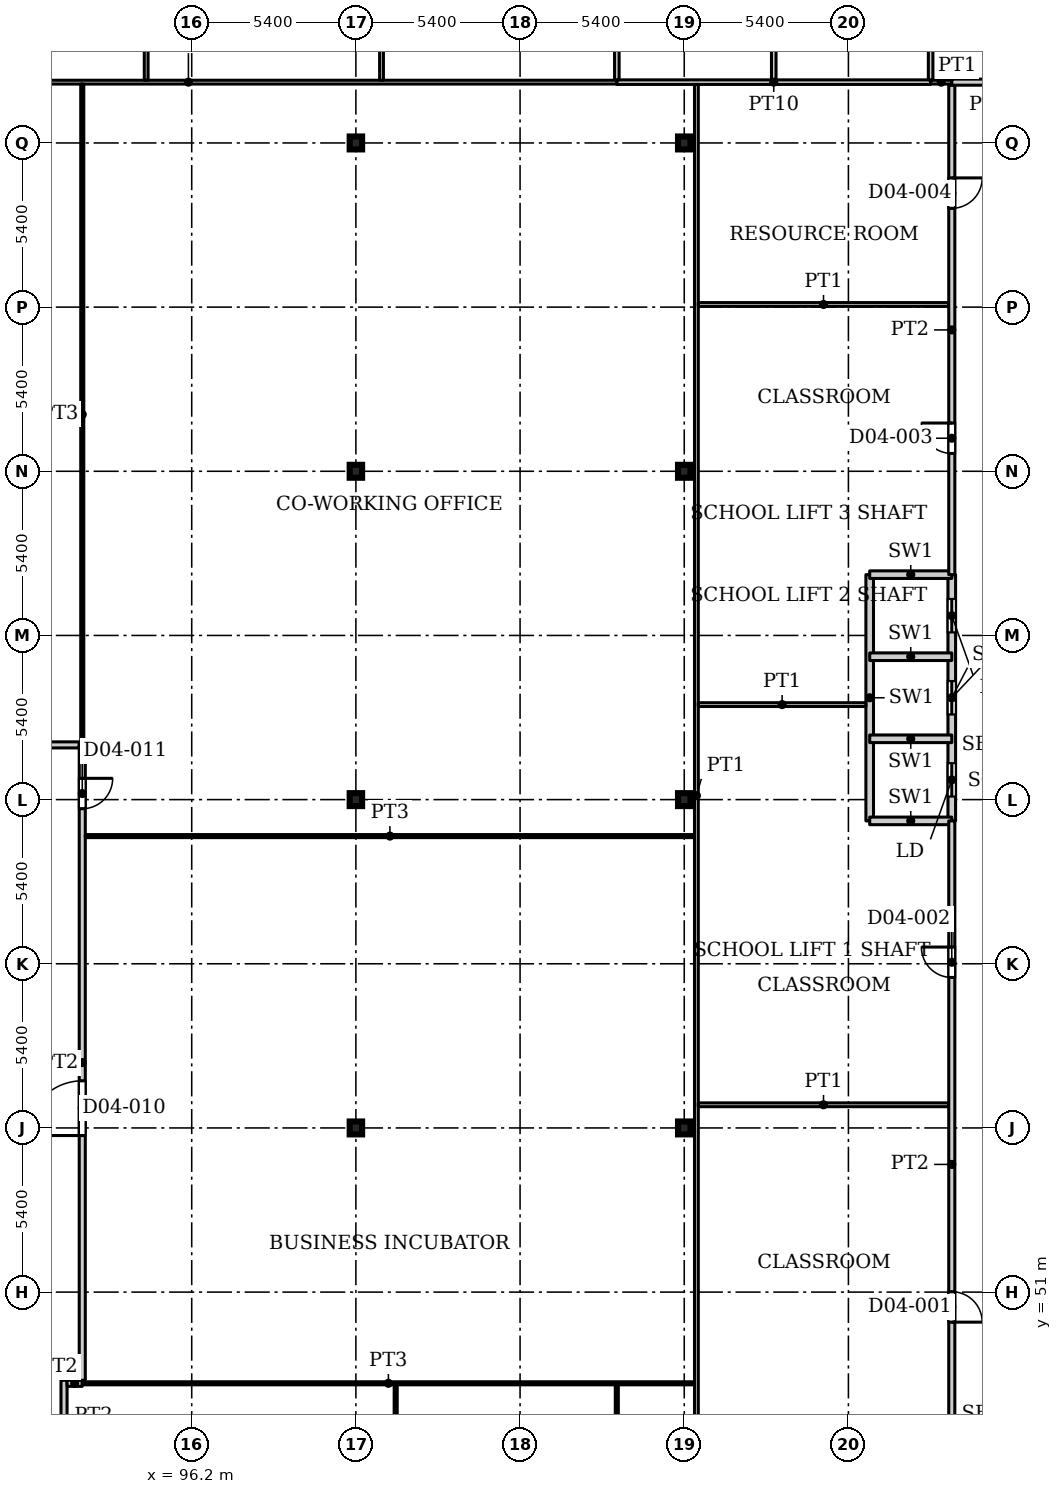
"""IFC4 building model, lengths in metres.
Left out: names, types, materials, properties, quantities, classifications, styles, units other than length and angle.
Written with IfcOpenShell. Run it as: python <this file> out.ifc"""

import sys

from ifc_helpers import new_model, si_unit, direction, frame, frame_2d, origin, origin_2d, place, context, subcontext, project, spatial, rectangle, i_section, extrude, source, transform, mapped, element, fill, save


model = new_model("IFC4")
c1 = context("Model", 3, precision=1e-05, world=origin(), true_north=direction((0.0, 1.0)))
c2 = subcontext(c1, "Body", "Model", "MODEL_VIEW")
j1 = project(units=[si_unit("LENGTHUNIT", "METRE"), si_unit("PLANEANGLEUNIT", "RADIAN")], contexts=[c1])
p1 = place(None, origin())
s1 = spatial("IfcSite", under=j1, at=p1, CompositionType="ELEMENT")
p2 = place(p1, origin())
s2 = spatial("IfcBuilding", under=s1, at=p2, CompositionType="ELEMENT")
p3 = place(p2, frame((0.0, 0.0, 21.5)))
s3 = spatial("IfcBuildingStorey", under=s2, at=p3, CompositionType="ELEMENT", Elevation=21.5)
for number, where, z_axis, x_axis in (
    (1, (101.6, 56.4, 0.0), (0.0, 0.0, 1.0), (1.0, 0.0, 0.0)),
    (2, (112.4, 56.4, 0.0), (0.0, 0.0, 1.0), (1.0, 0.0, 0.0)),
    (3, (101.6, 67.2, 0.0), (0.0, 0.0, 1.0), (1.0, 0.0, 0.0)),
    (4, (112.4, 67.2, 0.0), (0.0, 0.0, 1.0), (1.0, 0.0, 0.0)),
    (5, (101.6, 78.0, 0.0), (0.0, 0.0, 1.0), (1.0, 0.0, 0.0)),
    (6, (112.4, 78.0, 0.0), (0.0, 0.0, 1.0), (1.0, 0.0, 0.0)),
    (7, (101.6, 88.8, 0.0), (0.0, 0.0, 1.0), (1.0, 0.0, 0.0)),
    (8, (112.4, 88.8, 0.0), (0.0, 0.0, 1.0), (1.0, 0.0, 0.0)),
):
    element("IfcColumn", number, at=place(p3, frame(where, z_axis=z_axis, x_axis=x_axis)), inside=s3, PredefinedType="COLUMN", context=c2, shape_type="SweptSolid", body=[
        extrude(i_section(OverallWidth=0.409, OverallDepth=0.425, WebThickness=0.033, FlangeThickness=0.052, FilletRadius=0.013, at=origin_2d()), origin(), (0.0, 0.0, 1.0), 4.5),
    ])
p4 = place(p3, frame((118.5, 66.5, 0.0), z_axis=(0.0, 0.0, 1.0), x_axis=(0.0, 1.0, 0.0)))
e9 = element("IfcWall", 9, at=p4, inside=s3, PredefinedType="PARTITIONING", context=c2, shape_type="SweptSolid", body=[
    extrude(rectangle(XDim=8.1, YDim=0.25, at=frame_2d((4.05, 0.0))), origin(), (0.0, 0.0, 1.0), 4.5),
])
p5 = place(p3, frame((121.2, 66.5, 0.0), z_axis=(0.0, 0.0, 1.0), x_axis=(0.0, 1.0, 0.0)))
e10 = element("IfcWall", 10, at=p5, inside=s3, PredefinedType="PARTITIONING", context=c2, shape_type="SweptSolid", body=[
    extrude(rectangle(XDim=8.1, YDim=0.25, at=frame_2d((4.05, 0.0))), origin(), (0.0, 0.0, 1.0), 4.5),
])
p6 = place(p5, frame((0.8, 0.0, 0.0)))
e11 = element("IfcOpeningElement", 11, at=p6, cuts=e10, PredefinedType="OPENING", context=c2, shape_type="SweptSolid", body=[
    extrude(rectangle(XDim=1.1, YDim=2.2, at=frame_2d((0.55, 1.1))), frame((0.0, 0.135, 0.0), z_axis=(0.0, -1.0, 0.0), x_axis=(1.0, 0.0, 0.0)), (0.0, 0.0, 1.0), 0.27),
])
p7 = place(p5, frame((3.5, 0.0, 0.0)))
e12 = element("IfcOpeningElement", 12, at=p7, cuts=e10, PredefinedType="OPENING", context=c2, shape_type="SweptSolid", body=[
    extrude(rectangle(XDim=1.1, YDim=2.2, at=frame_2d((0.55, 1.1))), frame((0.0, 0.135, 0.0), z_axis=(0.0, -1.0, 0.0), x_axis=(1.0, 0.0, 0.0)), (0.0, 0.0, 1.0), 0.27),
])
p8 = place(p5, frame((6.2, 0.0, 0.0)))
e13 = element("IfcOpeningElement", 13, at=p8, cuts=e10, PredefinedType="OPENING", context=c2, shape_type="SweptSolid", body=[
    extrude(rectangle(XDim=1.1, YDim=2.2, at=frame_2d((0.55, 1.1))), frame((0.0, 0.135, 0.0), z_axis=(0.0, -1.0, 0.0), x_axis=(1.0, 0.0, 0.0)), (0.0, 0.0, 1.0), 0.27),
])
for number, where, z_axis, x_axis in (
    (14, (118.5, 66.5, 0.0), (0.0, 0.0, 1.0), (1.0, 0.0, 0.0)),
    (15, (118.5, 69.2, 0.0), (0.0, 0.0, 1.0), (1.0, 0.0, 0.0)),
    (16, (118.5, 71.9, 0.0), (0.0, 0.0, 1.0), (1.0, 0.0, 0.0)),
    (17, (118.5, 74.6, 0.0), (0.0, 0.0, 1.0), (1.0, 0.0, 0.0)),
):
    element("IfcWall", number, at=place(p3, frame(where, z_axis=z_axis, x_axis=x_axis)), inside=s3, PredefinedType="PARTITIONING", context=c2, shape_type="SweptSolid", body=[
        extrude(rectangle(XDim=2.7, YDim=0.25, at=frame_2d((1.35, 0.0))), origin(), (0.0, 0.0, 1.0), 4.5),
    ])
p9 = place(p3, frame((67.5, 69.0, 0.0), z_axis=(0.0, 0.0, 1.0), x_axis=(1.0, 0.0, 0.0)))
e18 = element("IfcWall", 18, at=p9, inside=s3, PredefinedType="PARTITIONING", context=c2, shape_type="SweptSolid", body=[
    extrude(rectangle(XDim=25.0, YDim=0.2, at=frame_2d((12.5, 0.0))), origin(), (0.0, 0.0, 1.0), 4.18),
])
p10 = place(p9, frame((11.4, 0.0, 0.0)))
e19 = element("IfcOpeningElement", 19, at=p10, cuts=e18, PredefinedType="OPENING", context=c2, shape_type="SweptSolid", body=[
    extrude(rectangle(XDim=2.0, YDim=2.1, at=frame_2d((1.0, 1.05))), frame((0.0, 0.11, 0.0), z_axis=(0.0, -1.0, 0.0), x_axis=(1.0, 0.0, 0.0)), (0.0, 0.0, 1.0), 0.22),
])
p11 = place(p9, frame((4.3, 0.0, 0.0)))
e20 = element("IfcOpeningElement", 20, at=p11, cuts=e18, PredefinedType="OPENING", context=c2, shape_type="SweptSolid", body=[
    extrude(rectangle(XDim=1.8, YDim=2.1, at=frame_2d((0.9, 1.05))), frame((0.0, 0.11, 0.0), z_axis=(0.0, -1.0, 0.0), x_axis=(1.0, 0.0, 0.0)), (0.0, 0.0, 1.0), 0.22),
])
p12 = place(p9, frame((18.9, 0.0, 0.0)))
e21 = element("IfcOpeningElement", 21, at=p12, cuts=e18, PredefinedType="OPENING", context=c2, shape_type="SweptSolid", body=[
    extrude(rectangle(XDim=1.8, YDim=2.1, at=frame_2d((0.9, 1.05))), frame((0.0, 0.11, 0.0), z_axis=(0.0, -1.0, 0.0), x_axis=(1.0, 0.0, 0.0)), (0.0, 0.0, 1.0), 0.22),
])
p13 = place(p3, frame((82.0, 90.8, 0.0), z_axis=(0.0, 0.0, 1.0), x_axis=(1.0, 0.0, 0.0)))
e22 = element("IfcWall", 22, at=p13, inside=s3, PredefinedType="PARTITIONING", context=c2, shape_type="SweptSolid", body=[
    extrude(rectangle(XDim=28.183, YDim=0.125, at=frame_2d((14.092, 0.0))), origin(), (0.0, 0.0, 1.0), 4.18),
])
p14 = place(p3, frame((92.0, 43.8, 0.0), z_axis=(0.0, 0.0, 1.0), x_axis=(0.0, 1.0, 0.0)))
e23 = element("IfcWall", 23, at=p14, inside=s3, PredefinedType="PARTITIONING", context=c2, shape_type="SweptSolid", body=[
    extrude(rectangle(XDim=4.3, YDim=0.2, at=frame_2d((2.15, 0.0))), origin(), (0.0, 0.0, 1.0), 4.18),
])
p15 = place(p3, frame((92.1, 48.0, 0.0), z_axis=(0.0, 0.0, 1.0), x_axis=(1.0, 0.0, 0.0)))
e24 = element("IfcWall", 24, at=p15, inside=s3, PredefinedType="PARTITIONING", context=c2, shape_type="SweptSolid", body=[
    extrude(rectangle(XDim=0.5, YDim=0.2, at=frame_2d((0.25, 0.0))), origin(), (0.0, 0.0, 1.0), 4.18),
])
p16 = place(p3, frame((92.6, 48.0, 0.0), z_axis=(0.0, 0.0, 1.0), x_axis=(1.0, 0.0, 0.0)))
e25 = element("IfcWall", 25, at=p16, inside=s3, PredefinedType="PARTITIONING", context=c2, shape_type="SweptSolid", body=[
    extrude(rectangle(XDim=20.138, YDim=0.1, at=frame_2d((10.069, 0.0))), origin(), (0.0, 0.0, 1.0), 4.18),
])
p17 = place(p3, frame((92.6, 48.1, 0.0), z_axis=(0.0, 0.0, 1.0), x_axis=(0.0, 1.0, 0.0)))
e26 = element("IfcWall", 26, at=p17, inside=s3, PredefinedType="PARTITIONING", context=c2, shape_type="SweptSolid", body=[
    extrude(rectangle(XDim=20.9, YDim=0.2, at=frame_2d((10.45, 0.0))), origin(), (0.0, 0.0, 1.0), 4.18),
])
p18 = place(p17, frame((8.05, 0.0, 0.0)))
e27 = element("IfcOpeningElement", 27, at=p18, cuts=e26, PredefinedType="OPENING", context=c2, shape_type="SweptSolid", body=[
    extrude(rectangle(XDim=1.8, YDim=2.1, at=frame_2d((0.9, 1.05))), frame((0.0, 0.11, 0.0), z_axis=(0.0, -1.0, 0.0), x_axis=(1.0, 0.0, 0.0)), (0.0, 0.0, 1.0), 0.22),
])
p19 = place(p17, frame((18.8, 0.0, 0.0)))
e28 = element("IfcOpeningElement", 28, at=p19, cuts=e26, PredefinedType="OPENING", context=c2, shape_type="SweptSolid", body=[
    extrude(rectangle(XDim=1.0, YDim=2.1, at=frame_2d((0.5, 1.05))), frame((0.0, 0.11, 0.0), z_axis=(0.0, -1.0, 0.0), x_axis=(1.0, 0.0, 0.0)), (0.0, 0.0, 1.0), 0.22),
])
p20 = place(p3, frame((92.6, 69.0, 0.0), z_axis=(0.0, 0.0, 1.0), x_axis=(0.0, 1.0, 0.0)))
e29 = element("IfcWall", 29, at=p20, inside=s3, PredefinedType="PARTITIONING", context=c2, shape_type="SweptSolid", body=[
    extrude(rectangle(XDim=21.738, YDim=0.1, at=frame_2d((10.869, 0.0))), origin(), (0.0, 0.0, 1.0), 4.18),
])
p21 = place(p3, frame((92.7, 66.0, 0.0), z_axis=(0.0, 0.0, 1.0), x_axis=(1.0, 0.0, 0.0)))
e30 = element("IfcWall", 30, at=p21, inside=s3, PredefinedType="PARTITIONING", context=c2, shape_type="SweptSolid", body=[
    extrude(rectangle(XDim=20.038, YDim=0.1, at=frame_2d((10.019, 0.0))), origin(), (0.0, 0.0, 1.0), 4.18),
])
for number, where, z_axis, x_axis in (
    (31, (94.702, 90.862, 0.0), (0.0, 0.0, 1.0), (0.0, 1.0, 0.0)),
    (32, (102.443, 90.862, 0.0), (0.0, 0.0, 1.0), (0.0, 1.0, 0.0)),
):
    element("IfcWall", number, at=place(p3, frame(where, z_axis=z_axis, x_axis=x_axis)), inside=s3, PredefinedType="PARTITIONING", context=c2, shape_type="SweptSolid", body=[
        extrude(rectangle(XDim=8.238, YDim=0.125, at=frame_2d((4.119, 0.0))), origin(), (0.0, 0.0, 1.0), 4.18),
    ])
for number, where, z_axis, x_axis in (
    (33, (102.909, 35.3, 0.0), (0.0, 0.0, 1.0), (0.0, 1.0, 0.0)),
    (34, (110.182, 35.3, 0.0), (0.0, 0.0, 1.0), (0.0, 1.0, 0.0)),
):
    element("IfcWall", number, at=place(p3, frame(where, z_axis=z_axis, x_axis=x_axis)), inside=s3, PredefinedType="PARTITIONING", context=c2, shape_type="SweptSolid", body=[
        extrude(rectangle(XDim=12.65, YDim=0.1, at=frame_2d((6.325, 0.0))), origin(), (0.0, 0.0, 1.0), 4.18),
    ])
p22 = place(p3, frame((110.183, 90.8, 0.0), z_axis=(0.0, 0.0, 1.0), x_axis=(1.0, 0.0, 0.0)))
e35 = element("IfcWall", 35, at=p22, inside=s3, PredefinedType="PARTITIONING", context=c2, shape_type="SweptSolid", body=[
    extrude(rectangle(XDim=10.321, YDim=0.15, at=frame_2d((5.16, 0.0))), origin(), (0.0, 0.0, 1.0), 4.18),
])
p23 = place(p3, frame((110.183, 90.875, 0.0), z_axis=(0.0, 0.0, 1.0), x_axis=(0.0, 1.0, 0.0)))
e36 = element("IfcWall", 36, at=p23, inside=s3, PredefinedType="PARTITIONING", context=c2, shape_type="SweptSolid", body=[
    extrude(rectangle(XDim=8.225, YDim=0.15, at=frame_2d((4.113, 0.0))), origin(), (0.0, 0.0, 1.0), 4.18),
])
p24 = place(p3, frame((112.8, 43.938, 0.0), z_axis=(0.0, 0.0, 1.0), x_axis=(0.0, 1.0, 0.0)))
e37 = element("IfcWall", 37, at=p24, inside=s3, PredefinedType="PARTITIONING", context=c2, shape_type="SweptSolid", body=[
    extrude(rectangle(XDim=46.787, YDim=0.125, at=frame_2d((23.394, 0.0))), origin(), (0.0, 0.0, 1.0), 4.18),
])
p25 = place(p3, frame((112.862, 57.162, 0.0), z_axis=(0.0, 0.0, 1.0), x_axis=(1.0, 0.0, 0.0)))
e38 = element("IfcWall", 38, at=p25, inside=s3, PredefinedType="PARTITIONING", context=c2, shape_type="SweptSolid", body=[
    extrude(rectangle(XDim=8.238, YDim=0.125, at=frame_2d((4.119, 0.0))), origin(), (0.0, 0.0, 1.0), 4.18),
])
p26 = place(p3, frame((112.862, 70.325, 0.0), z_axis=(0.0, 0.0, 1.0), x_axis=(1.0, 0.0, 0.0)))
e39 = element("IfcWall", 39, at=p26, inside=s3, PredefinedType="PARTITIONING", context=c2, shape_type="SweptSolid", body=[
    extrude(rectangle(XDim=5.514, YDim=0.125, at=frame_2d((2.757, 0.0))), origin(), (0.0, 0.0, 1.0), 4.18),
])
p27 = place(p3, frame((112.862, 83.487, 0.0), z_axis=(0.0, 0.0, 1.0), x_axis=(1.0, 0.0, 0.0)))
e40 = element("IfcWall", 40, at=p27, inside=s3, PredefinedType="PARTITIONING", context=c2, shape_type="SweptSolid", body=[
    extrude(rectangle(XDim=8.238, YDim=0.125, at=frame_2d((4.119, 0.0))), origin(), (0.0, 0.0, 1.0), 4.18),
])
p28 = place(p3, frame((115.344, 90.875, 0.0), z_axis=(0.0, 0.0, 1.0), x_axis=(0.0, 1.0, 0.0)))
e41 = element("IfcWall", 41, at=p28, inside=s3, PredefinedType="PARTITIONING", context=c2, shape_type="SweptSolid", body=[
    extrude(rectangle(XDim=8.225, YDim=0.15, at=frame_2d((4.113, 0.0))), origin(), (0.0, 0.0, 1.0), 4.18),
])
p29 = place(p3, frame((120.504, 90.8, 0.0), z_axis=(0.0, 0.0, 1.0), x_axis=(1.0, 0.0, 0.0)))
e42 = element("IfcWall", 42, at=p29, inside=s3, PredefinedType="PARTITIONING", context=c2, shape_type="SweptSolid", body=[
    extrude(rectangle(XDim=0.696, YDim=0.125, at=frame_2d((0.348, 0.0))), origin(), (0.0, 0.0, 1.0), 4.18),
])
p30 = place(p3, frame((120.504, 90.875, 0.0), z_axis=(0.0, 0.0, 1.0), x_axis=(0.0, 1.0, 0.0)))
e43 = element("IfcWall", 43, at=p30, inside=s3, PredefinedType="PARTITIONING", context=c2, shape_type="SweptSolid", body=[
    extrude(rectangle(XDim=8.225, YDim=0.15, at=frame_2d((4.113, 0.0))), origin(), (0.0, 0.0, 1.0), 4.18),
])
p31 = place(p3, frame((121.2, 43.9, 0.0), z_axis=(0.0, 0.0, 1.0), x_axis=(0.0, 1.0, 0.0)))
e44 = element("IfcWall", 44, at=p31, inside=s3, PredefinedType="PARTITIONING", context=c2, shape_type="SweptSolid", body=[
    extrude(rectangle(XDim=22.6, YDim=0.2, at=frame_2d((11.3, 0.0))), origin(), (0.0, 0.0, 1.0), 4.18),
])
p32 = place(p31, frame((6.112, 0.0, 0.0)))
e45 = element("IfcOpeningElement", 45, at=p32, cuts=e44, PredefinedType="OPENING", context=c2, shape_type="SweptSolid", body=[
    extrude(rectangle(XDim=1.0, YDim=2.1, at=frame_2d((0.5, 1.05))), frame((0.0, 0.11, 0.0), z_axis=(0.0, -1.0, 0.0), x_axis=(1.0, 0.0, 0.0)), (0.0, 0.0, 1.0), 0.22),
])
p33 = place(p31, frame((17.45, 0.0, 0.0)))
e46 = element("IfcOpeningElement", 46, at=p33, cuts=e44, PredefinedType="OPENING", context=c2, shape_type="SweptSolid", body=[
    extrude(rectangle(XDim=1.0, YDim=2.1, at=frame_2d((0.5, 1.05))), frame((0.0, 0.11, 0.0), z_axis=(0.0, -1.0, 0.0), x_axis=(1.0, 0.0, 0.0)), (0.0, 0.0, 1.0), 0.22),
])
p34 = place(p3, frame((121.2, 74.6, 0.0), z_axis=(0.0, 0.0, 1.0), x_axis=(0.0, 1.0, 0.0)))
e47 = element("IfcWall", 47, at=p34, inside=s3, PredefinedType="PARTITIONING", context=c2, shape_type="SweptSolid", body=[
    extrude(rectangle(XDim=16.1, YDim=0.2, at=frame_2d((8.05, 0.0))), origin(), (0.0, 0.0, 1.0), 4.18),
])
p35 = place(p34, frame((3.987, 0.0, 0.0)))
e48 = element("IfcOpeningElement", 48, at=p35, cuts=e47, PredefinedType="OPENING", context=c2, shape_type="SweptSolid", body=[
    extrude(rectangle(XDim=1.0, YDim=2.1, at=frame_2d((0.5, 1.05))), frame((0.0, 0.11, 0.0), z_axis=(0.0, -1.0, 0.0), x_axis=(1.0, 0.0, 0.0)), (0.0, 0.0, 1.0), 0.22),
])
p36 = place(p34, frame((12.05, 0.0, 0.0)))
e49 = element("IfcOpeningElement", 49, at=p36, cuts=e47, PredefinedType="OPENING", context=c2, shape_type="SweptSolid", body=[
    extrude(rectangle(XDim=1.0, YDim=2.1, at=frame_2d((0.5, 1.05))), frame((0.0, 0.11, 0.0), z_axis=(0.0, -1.0, 0.0), x_axis=(1.0, 0.0, 0.0)), (0.0, 0.0, 1.0), 0.22),
])
p37 = place(p3, frame((121.2, 90.8, 0.0), z_axis=(0.0, 0.0, 1.0), x_axis=(1.0, 0.0, 0.0)))
e50 = element("IfcWall", 50, at=p37, inside=s3, PredefinedType="PARTITIONING", context=c2, shape_type="SweptSolid", body=[
    extrude(rectangle(XDim=2.4, YDim=0.2, at=frame_2d((1.2, 0.0))), origin(), (0.0, 0.0, 1.0), 4.18),
])
m1 = source(origin(), c2, "Body", "SweptSolid", [
    extrude(rectangle(XDim=1.1, YDim=2.2, at=frame_2d((0.55, 1.1))), frame((0.0, 0.025, 0.0), z_axis=(0.0, -1.0, 0.0), x_axis=(1.0, 0.0, 0.0)), (0.0, 0.0, 1.0), 0.05),
])
p38 = place(p6, origin())
e51 = element("IfcDoor", 51, at=p38, inside=s3, OperationType="SLIDING_TO_LEFT", PredefinedType="DOOR", context=c2, shape_type="MappedRepresentation", body=[
    mapped(m1, transform((0.0, 0.0, 0.0), x_axis=(1.0, 0.0, 0.0), y_axis=(0.0, 1.0, 0.0), z_axis=(0.0, 0.0, 1.0), scale=1.0)),
])
fill(e11, e51)
p39 = place(p7, origin())
e52 = element("IfcDoor", 52, at=p39, inside=s3, OperationType="SLIDING_TO_LEFT", PredefinedType="DOOR", context=c2, shape_type="MappedRepresentation", body=[
    mapped(m1, transform((0.0, 0.0, 0.0), x_axis=(1.0, 0.0, 0.0), y_axis=(0.0, 1.0, 0.0), z_axis=(0.0, 0.0, 1.0), scale=1.0)),
])
fill(e12, e52)
p40 = place(p8, origin())
e53 = element("IfcDoor", 53, at=p40, inside=s3, OperationType="SLIDING_TO_LEFT", PredefinedType="DOOR", context=c2, shape_type="MappedRepresentation", body=[
    mapped(m1, transform((0.0, 0.0, 0.0), x_axis=(1.0, 0.0, 0.0), y_axis=(0.0, 1.0, 0.0), z_axis=(0.0, 0.0, 1.0), scale=1.0)),
])
fill(e13, e53)
m2 = source(origin(), c2, "Body", "SweptSolid", [
    extrude(rectangle(XDim=1.0, YDim=2.1, at=frame_2d((0.5, 1.05))), frame((0.0, 0.025, 0.0), z_axis=(0.0, -1.0, 0.0), x_axis=(1.0, 0.0, 0.0)), (0.0, 0.0, 1.0), 0.05),
])
p41 = place(p32, origin())
e54 = element("IfcDoor", 54, at=p41, inside=s3, OperationType="SINGLE_SWING_RIGHT", PredefinedType="DOOR", context=c2, shape_type="MappedRepresentation", body=[
    mapped(m2, transform((0.0, 0.0, 0.0), x_axis=(1.0, 0.0, 0.0), y_axis=(0.0, 1.0, 0.0), z_axis=(0.0, 0.0, 1.0), scale=1.0)),
])
fill(e45, e54)
p42 = place(p33, origin())
e55 = element("IfcDoor", 55, at=p42, inside=s3, OperationType="SINGLE_SWING_LEFT", PredefinedType="DOOR", context=c2, shape_type="MappedRepresentation", body=[
    mapped(m2, transform((0.0, 0.0, 0.0), x_axis=(1.0, 0.0, 0.0), y_axis=(0.0, 1.0, 0.0), z_axis=(0.0, 0.0, 1.0), scale=1.0)),
])
fill(e46, e55)
p43 = place(p35, origin())
e56 = element("IfcDoor", 56, at=p43, inside=s3, OperationType="SINGLE_SWING_LEFT", PredefinedType="DOOR", context=c2, shape_type="MappedRepresentation", body=[
    mapped(m2, transform((0.0, 0.0, 0.0), x_axis=(1.0, 0.0, 0.0), y_axis=(0.0, 1.0, 0.0), z_axis=(0.0, 0.0, 1.0), scale=1.0)),
])
fill(e48, e56)
p44 = place(p36, origin())
e57 = element("IfcDoor", 57, at=p44, inside=s3, OperationType="SINGLE_SWING_RIGHT", PredefinedType="DOOR", context=c2, shape_type="MappedRepresentation", body=[
    mapped(m2, transform((0.0, 0.0, 0.0), x_axis=(1.0, 0.0, 0.0), y_axis=(0.0, 1.0, 0.0), z_axis=(0.0, 0.0, 1.0), scale=1.0)),
])
fill(e49, e57)
m3 = source(origin(), c2, "Body", "SweptSolid", [
    extrude(rectangle(XDim=1.8, YDim=2.1, at=frame_2d((0.9, 1.05))), frame((0.0, 0.025, 0.0), z_axis=(0.0, -1.0, 0.0), x_axis=(1.0, 0.0, 0.0)), (0.0, 0.0, 1.0), 0.05),
])
p45 = place(p18, origin())
e58 = element("IfcDoor", 58, at=p45, inside=s3, OperationType="DOUBLE_DOOR_SINGLE_SWING", PredefinedType="DOOR", context=c2, shape_type="MappedRepresentation", body=[
    mapped(m3, transform((0.0, 0.0, 0.0), x_axis=(1.0, 0.0, 0.0), y_axis=(0.0, 1.0, 0.0), z_axis=(0.0, 0.0, 1.0), scale=1.0)),
])
fill(e27, e58)
p46 = place(p19, origin())
e59 = element("IfcDoor", 59, at=p46, inside=s3, OperationType="SINGLE_SWING_RIGHT", PredefinedType="DOOR", context=c2, shape_type="MappedRepresentation", body=[
    mapped(m2, transform((0.0, 0.0, 0.0), x_axis=(1.0, 0.0, 0.0), y_axis=(0.0, 1.0, 0.0), z_axis=(0.0, 0.0, 1.0), scale=1.0)),
])
fill(e28, e59)
save(model, sys.argv[1])
